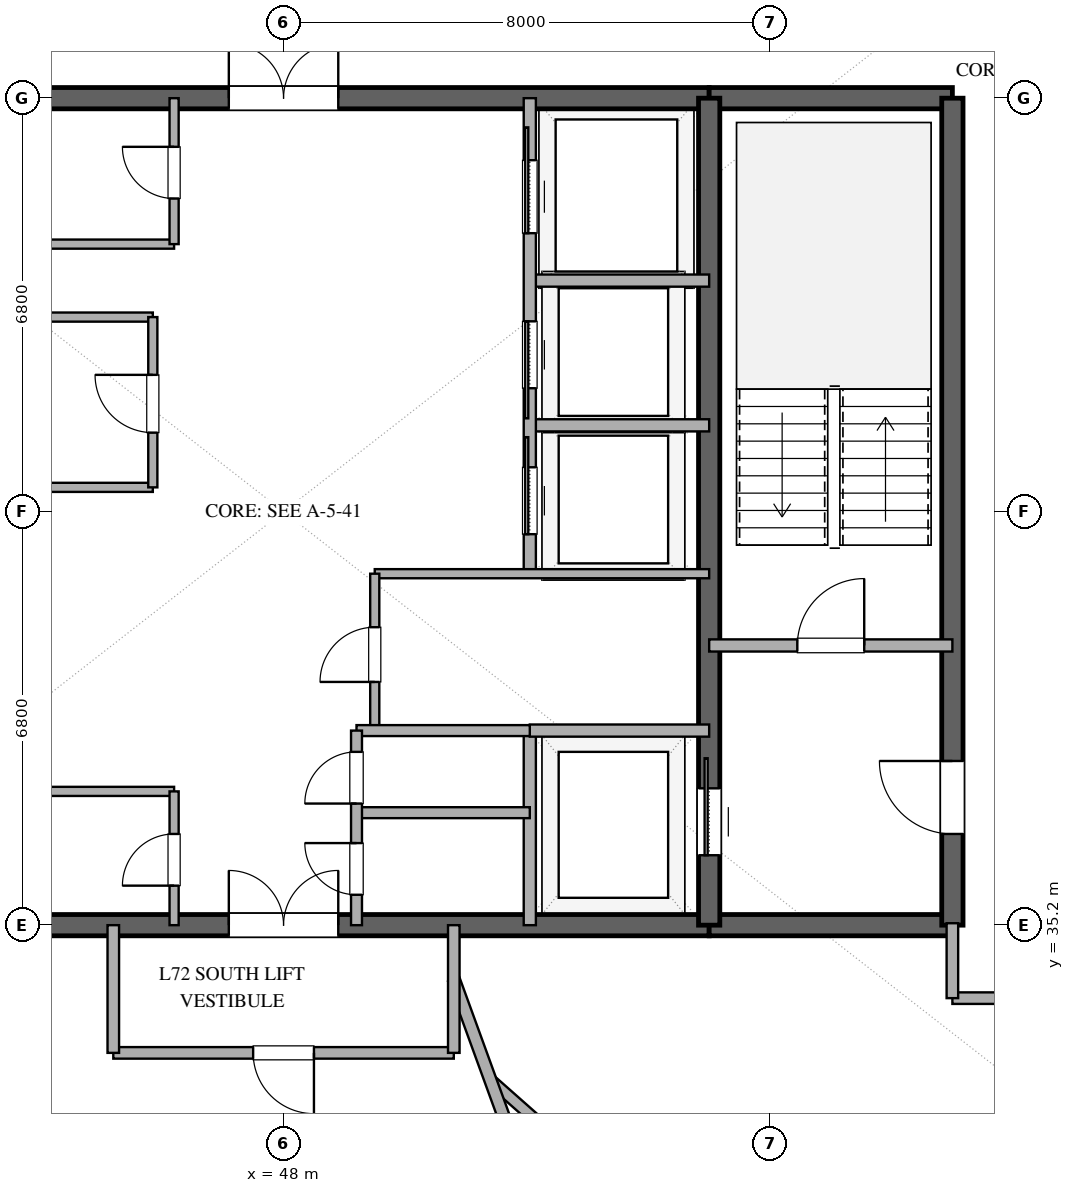
"""IFC4 building model, lengths in metres.
Left out: names, types, materials, properties, quantities, classifications, styles, units other than length and angle.
Written with IfcOpenShell. Run it as: python <this file> out.ifc"""

import sys

from ifc_helpers import new_model, si_unit, direction, frame, frame_2d, origin, place, context, subcontext, project, spatial, rectangle, extrude, element, fill, save


model = new_model("IFC4")
c1 = context("Model", 3, precision=1e-05, world=origin(), true_north=direction((0.0, 1.0)))
c2 = subcontext(c1, "Body", "Model", "MODEL_VIEW")
j1 = project(units=[si_unit("LENGTHUNIT", "METRE"), si_unit("PLANEANGLEUNIT", "RADIAN")], contexts=[c1])
p1 = place(None, origin())
s1 = spatial("IfcSite", under=j1, at=p1, CompositionType="ELEMENT")
p2 = place(p1, origin())
s2 = spatial("IfcBuilding", under=s1, at=p2, CompositionType="ELEMENT")
p3 = place(p2, frame((0.0, 0.0, 280.2)))
s3 = spatial("IfcBuildingStorey", under=s2, at=p3, CompositionType="ELEMENT", Elevation=280.2)
p4 = place(p3, frame((41.0, 35.2, 0.0), z_axis=(0.0, 0.0, 1.0), x_axis=(1.0, 0.0, 0.0)))
e1 = element("IfcWall", 1, at=p4, inside=s3, PredefinedType="SHEAR", context=c2, shape_type="SweptSolid", body=[
    extrude(rectangle(XDim=14.0, YDim=0.35, at=frame_2d((7.0, 0.0))), origin(), (0.0, 0.0, 1.0), 3.37),
])
p5 = place(p4, frame((6.1, 0.0, 0.0)))
e2 = element("IfcOpeningElement", 2, at=p5, cuts=e1, PredefinedType="OPENING", context=c2, shape_type="SweptSolid", body=[
    extrude(rectangle(XDim=1.8, YDim=2.25, at=frame_2d((0.9, 1.125))), frame((0.0, 0.185, 0.0), z_axis=(0.0, -1.0, 0.0), x_axis=(1.0, 0.0, 0.0)), (0.0, 0.0, 1.0), 0.37),
])
p6 = place(p3, frame((55.0, 35.2, 0.0), z_axis=(0.0, 0.0, 1.0), x_axis=(1.0, 0.0, 0.0)))
e3 = element("IfcWall", 3, at=p6, inside=s3, PredefinedType="SHEAR", context=c2, shape_type="SweptSolid", body=[
    extrude(rectangle(XDim=4.0, YDim=0.35, at=frame_2d((2.0, 0.0))), origin(), (0.0, 0.0, 1.0), 3.37),
])
p7 = place(p3, frame((41.0, 48.8, 0.0), z_axis=(0.0, 0.0, 1.0), x_axis=(1.0, 0.0, 0.0)))
e4 = element("IfcWall", 4, at=p7, inside=s3, PredefinedType="SHEAR", context=c2, shape_type="SweptSolid", body=[
    extrude(rectangle(XDim=14.0, YDim=0.35, at=frame_2d((7.0, 0.0))), origin(), (0.0, 0.0, 1.0), 3.37),
])
p8 = place(p7, frame((6.1, 0.0, 0.0)))
e5 = element("IfcOpeningElement", 5, at=p8, cuts=e4, PredefinedType="OPENING", context=c2, shape_type="SweptSolid", body=[
    extrude(rectangle(XDim=1.8, YDim=2.25, at=frame_2d((0.9, 1.125))), frame((0.0, 0.185, 0.0), z_axis=(0.0, -1.0, 0.0), x_axis=(1.0, 0.0, 0.0)), (0.0, 0.0, 1.0), 0.37),
])
p9 = place(p3, frame((55.0, 48.8, 0.0), z_axis=(0.0, 0.0, 1.0), x_axis=(1.0, 0.0, 0.0)))
e6 = element("IfcWall", 6, at=p9, inside=s3, PredefinedType="SHEAR", context=c2, shape_type="SweptSolid", body=[
    extrude(rectangle(XDim=4.0, YDim=0.35, at=frame_2d((2.0, 0.0))), origin(), (0.0, 0.0, 1.0), 3.37),
])
p10 = place(p3, frame((59.0, 35.2, 0.0), z_axis=(0.0, 0.0, 1.0), x_axis=(0.0, 1.0, 0.0)))
e7 = element("IfcWall", 7, at=p10, inside=s3, PredefinedType="SHEAR", context=c2, shape_type="SweptSolid", body=[
    extrude(rectangle(XDim=13.6, YDim=0.35, at=frame_2d((6.8, 0.0))), origin(), (0.0, 0.0, 1.0), 3.37),
])
p11 = place(p10, frame((1.5, 0.0, 0.0)))
e8 = element("IfcOpeningElement", 8, at=p11, cuts=e7, PredefinedType="OPENING", context=c2, shape_type="SweptSolid", body=[
    extrude(rectangle(XDim=1.2, YDim=2.15, at=frame_2d((0.6, 1.075))), frame((0.0, 0.185, 0.0), z_axis=(0.0, -1.0, 0.0), x_axis=(1.0, 0.0, 0.0)), (0.0, 0.0, 1.0), 0.37),
])
p12 = place(p3, frame((55.0, 35.2, 0.0), z_axis=(0.0, 0.0, 1.0), x_axis=(0.0, 1.0, 0.0)))
e9 = element("IfcWall", 9, at=p12, inside=s3, PredefinedType="SHEAR", context=c2, shape_type="SweptSolid", body=[
    extrude(rectangle(XDim=13.6, YDim=0.35, at=frame_2d((6.8, 0.0))), origin(), (0.0, 0.0, 1.0), 3.37),
])
p13 = place(p12, frame((1.15, 0.0, 0.0)))
e10 = element("IfcOpeningElement", 10, at=p13, cuts=e9, PredefinedType="OPENING", context=c2, shape_type="SweptSolid", body=[
    extrude(rectangle(XDim=1.1, YDim=2.2, at=frame_2d((0.55, 1.1))), frame((0.0, 0.185, 0.0), z_axis=(0.0, -1.0, 0.0), x_axis=(1.0, 0.0, 0.0)), (0.0, 0.0, 1.0), 0.37),
])
p14 = place(p3, frame((55.0, 39.8, 0.0), z_axis=(0.0, 0.0, 1.0), x_axis=(1.0, 0.0, 0.0)))
e11 = element("IfcWall", 11, at=p14, inside=s3, PredefinedType="SOLIDWALL", context=c2, shape_type="SweptSolid", body=[
    extrude(rectangle(XDim=4.0, YDim=0.2, at=frame_2d((2.0, 0.0))), origin(), (0.0, 0.0, 1.0), 2.73),
])
p15 = place(p14, frame((1.45, 0.0, 0.0)))
e12 = element("IfcOpeningElement", 12, at=p15, cuts=e11, PredefinedType="OPENING", context=c2, shape_type="SweptSolid", body=[
    extrude(rectangle(XDim=1.1, YDim=2.15, at=frame_2d((0.55, 1.075))), frame((0.0, 0.11, 0.0), z_axis=(0.0, -1.0, 0.0), x_axis=(1.0, 0.0, 0.0)), (0.0, 0.0, 1.0), 0.22),
])
p16 = place(p3, frame((52.05, 35.2, 0.0), z_axis=(0.0, 0.0, 1.0), x_axis=(0.0, 1.0, 0.0)))
e13 = element("IfcWall", 13, at=p16, inside=s3, PredefinedType="SOLIDWALL", context=c2, shape_type="SweptSolid", body=[
    extrude(rectangle(XDim=3.2, YDim=0.2, at=frame_2d((1.6, 0.0))), origin(), (0.0, 0.0, 1.0), 2.73),
])
p17 = place(p3, frame((52.05, 38.4, 0.0), z_axis=(0.0, 0.0, 1.0), x_axis=(1.0, 0.0, 0.0)))
e14 = element("IfcWall", 14, at=p17, inside=s3, PredefinedType="SOLIDWALL", context=c2, shape_type="SweptSolid", body=[
    extrude(rectangle(XDim=2.95, YDim=0.2, at=frame_2d((1.475, 0.0))), origin(), (0.0, 0.0, 1.0), 2.73),
])
for number, where, z_axis, x_axis in (
    (15, (41.0, 42.4, 0.0), (0.0, 0.0, 1.0), (1.0, 0.0, 0.0)),
    (16, (41.0, 45.2, 0.0), (0.0, 0.0, 1.0), (1.0, 0.0, 0.0)),
):
    element("IfcWall", number, at=place(p3, frame(where, z_axis=z_axis, x_axis=x_axis)), inside=s3, PredefinedType="PARTITIONING", context=c2, shape_type="SweptSolid", body=[
        extrude(rectangle(XDim=4.85, YDim=0.15, at=frame_2d((2.425, 0.0))), origin(), (0.0, 0.0, 1.0), 2.73),
    ])
p18 = place(p3, frame((45.85, 42.4, 0.0), z_axis=(0.0, 0.0, 1.0), x_axis=(0.0, 1.0, 0.0)))
e17 = element("IfcWall", 17, at=p18, inside=s3, PredefinedType="PARTITIONING", context=c2, shape_type="SweptSolid", body=[
    extrude(rectangle(XDim=2.8, YDim=0.15, at=frame_2d((1.4, 0.0))), origin(), (0.0, 0.0, 1.0), 2.73),
])
p19 = place(p18, frame((0.9, 0.0, 0.0)))
e18 = element("IfcOpeningElement", 18, at=p19, cuts=e17, PredefinedType="OPENING", context=c2, shape_type="SweptSolid", body=[
    extrude(rectangle(XDim=0.95, YDim=2.15, at=frame_2d((0.475, 1.075))), frame((0.0, 0.085, 0.0), z_axis=(0.0, -1.0, 0.0), x_axis=(1.0, 0.0, 0.0)), (0.0, 0.0, 1.0), 0.17),
])
for number, where, z_axis, x_axis in (
    (19, (52.05, 43.42, 0.0), (0.0, 0.0, 1.0), (1.0, 0.0, 0.0)),
    (20, (52.05, 45.8, 0.0), (0.0, 0.0, 1.0), (1.0, 0.0, 0.0)),
):
    element("IfcWall", number, at=place(p3, frame(where, z_axis=z_axis, x_axis=x_axis)), inside=s3, PredefinedType="SOLIDWALL", context=c2, shape_type="SweptSolid", body=[
        extrude(rectangle(XDim=2.95, YDim=0.2, at=frame_2d((1.475, 0.0))), origin(), (0.0, 0.0, 1.0), 2.73),
    ])
p20 = place(p3, frame((52.05, 40.98, 0.0), z_axis=(0.0, 0.0, 1.0), x_axis=(0.0, 1.0, 0.0)))
e21 = element("IfcWall", 21, at=p20, inside=s3, PredefinedType="SOLIDWALL", context=c2, shape_type="SweptSolid", body=[
    extrude(rectangle(XDim=7.82, YDim=0.2, at=frame_2d((3.91, 0.0))), origin(), (0.0, 0.0, 1.0), 2.73),
])
p21 = place(p20, frame((0.65, 0.0, 0.0)))
e22 = element("IfcOpeningElement", 22, at=p21, cuts=e21, PredefinedType="OPENING", context=c2, shape_type="SweptSolid", body=[
    extrude(rectangle(XDim=1.1, YDim=2.2, at=frame_2d((0.55, 1.1))), frame((0.0, 0.11, 0.0), z_axis=(0.0, -1.0, 0.0), x_axis=(1.0, 0.0, 0.0)), (0.0, 0.0, 1.0), 0.22),
])
p22 = place(p20, frame((3.05, 0.0, 0.0)))
e23 = element("IfcOpeningElement", 23, at=p22, cuts=e21, PredefinedType="OPENING", context=c2, shape_type="SweptSolid", body=[
    extrude(rectangle(XDim=1.1, YDim=2.2, at=frame_2d((0.55, 1.1))), frame((0.0, 0.11, 0.0), z_axis=(0.0, -1.0, 0.0), x_axis=(1.0, 0.0, 0.0)), (0.0, 0.0, 1.0), 0.22),
])
p23 = place(p20, frame((5.6, 0.0, 0.0)))
e24 = element("IfcOpeningElement", 24, at=p23, cuts=e21, PredefinedType="OPENING", context=c2, shape_type="SweptSolid", body=[
    extrude(rectangle(XDim=1.2, YDim=2.2, at=frame_2d((0.6, 1.1))), frame((0.0, 0.11, 0.0), z_axis=(0.0, -1.0, 0.0), x_axis=(1.0, 0.0, 0.0)), (0.0, 0.0, 1.0), 0.22),
])
p24 = place(p3, frame((49.5, 40.98, 0.0), z_axis=(0.0, 0.0, 1.0), x_axis=(1.0, 0.0, 0.0)))
e25 = element("IfcWall", 25, at=p24, inside=s3, PredefinedType="PARTITIONING", context=c2, shape_type="SweptSolid", body=[
    extrude(rectangle(XDim=5.5, YDim=0.15, at=frame_2d((2.75, 0.0))), origin(), (0.0, 0.0, 1.0), 2.73),
])
p25 = place(p3, frame((49.5, 38.4, 0.0), z_axis=(0.0, 0.0, 1.0), x_axis=(0.0, 1.0, 0.0)))
e26 = element("IfcWall", 26, at=p25, inside=s3, PredefinedType="PARTITIONING", context=c2, shape_type="SweptSolid", body=[
    extrude(rectangle(XDim=2.58, YDim=0.15, at=frame_2d((1.29, 0.0))), origin(), (0.0, 0.0, 1.0), 2.73),
])
p26 = place(p25, frame((0.8, 0.0, 0.0)))
e27 = element("IfcOpeningElement", 27, at=p26, cuts=e26, PredefinedType="OPENING", context=c2, shape_type="SweptSolid", body=[
    extrude(rectangle(XDim=0.9, YDim=2.15, at=frame_2d((0.45, 1.075))), frame((0.0, 0.085, 0.0), z_axis=(0.0, -1.0, 0.0), x_axis=(1.0, 0.0, 0.0)), (0.0, 0.0, 1.0), 0.17),
])
p27 = place(p3, frame((43.95, 37.4, 0.0), z_axis=(0.0, 0.0, 1.0), x_axis=(1.0, 0.0, 0.0)))
e28 = element("IfcWall", 28, at=p27, inside=s3, PredefinedType="PARTITIONING", context=c2, shape_type="SweptSolid", body=[
    extrude(rectangle(XDim=2.25, YDim=0.15, at=frame_2d((1.125, 0.0))), origin(), (0.0, 0.0, 1.0), 2.73),
])
p28 = place(p3, frame((46.2, 35.2, 0.0), z_axis=(0.0, 0.0, 1.0), x_axis=(0.0, 1.0, 0.0)))
e29 = element("IfcWall", 29, at=p28, inside=s3, PredefinedType="PARTITIONING", context=c2, shape_type="SweptSolid", body=[
    extrude(rectangle(XDim=2.2, YDim=0.15, at=frame_2d((1.1, 0.0))), origin(), (0.0, 0.0, 1.0), 2.73),
])
p29 = place(p28, frame((0.65, 0.0, 0.0)))
e30 = element("IfcOpeningElement", 30, at=p29, cuts=e29, PredefinedType="OPENING", context=c2, shape_type="SweptSolid", body=[
    extrude(rectangle(XDim=0.85, YDim=2.15, at=frame_2d((0.425, 1.075))), frame((0.0, 0.085, 0.0), z_axis=(0.0, -1.0, 0.0), x_axis=(1.0, 0.0, 0.0)), (0.0, 0.0, 1.0), 0.17),
])
p30 = place(p3, frame((43.95, 46.4, 0.0), z_axis=(0.0, 0.0, 1.0), x_axis=(1.0, 0.0, 0.0)))
e31 = element("IfcWall", 31, at=p30, inside=s3, PredefinedType="PARTITIONING", context=c2, shape_type="SweptSolid", body=[
    extrude(rectangle(XDim=2.25, YDim=0.15, at=frame_2d((1.125, 0.0))), origin(), (0.0, 0.0, 1.0), 2.73),
])
p31 = place(p3, frame((46.2, 46.4, 0.0), z_axis=(0.0, 0.0, 1.0), x_axis=(0.0, 1.0, 0.0)))
e32 = element("IfcWall", 32, at=p31, inside=s3, PredefinedType="PARTITIONING", context=c2, shape_type="SweptSolid", body=[
    extrude(rectangle(XDim=2.4, YDim=0.15, at=frame_2d((1.2, 0.0))), origin(), (0.0, 0.0, 1.0), 2.73),
])
p32 = place(p31, frame((0.75, 0.0, 0.0)))
e33 = element("IfcOpeningElement", 33, at=p32, cuts=e32, PredefinedType="OPENING", context=c2, shape_type="SweptSolid", body=[
    extrude(rectangle(XDim=0.85, YDim=2.15, at=frame_2d((0.425, 1.075))), frame((0.0, 0.085, 0.0), z_axis=(0.0, -1.0, 0.0), x_axis=(1.0, 0.0, 0.0)), (0.0, 0.0, 1.0), 0.17),
])
for number, where, z_axis, x_axis in (
    (34, (49.2, 37.05, 0.0), (0.0, 0.0, 1.0), (1.0, 0.0, 0.0)),
    (35, (49.2, 38.4, 0.0), (0.0, 0.0, 1.0), (1.0, 0.0, 0.0)),
):
    element("IfcWall", number, at=place(p3, frame(where, z_axis=z_axis, x_axis=x_axis)), inside=s3, PredefinedType="PLUMBINGWALL", context=c2, shape_type="SweptSolid", body=[
        extrude(rectangle(XDim=2.85, YDim=0.18, at=frame_2d((1.425, 0.0))), origin(), (0.0, 0.0, 1.0), 2.73),
    ])
p33 = place(p3, frame((49.2, 35.2, 0.0), z_axis=(0.0, 0.0, 1.0), x_axis=(0.0, 1.0, 0.0)))
e36 = element("IfcWall", 36, at=p33, inside=s3, PredefinedType="PLUMBINGWALL", context=c2, shape_type="SweptSolid", body=[
    extrude(rectangle(XDim=3.2, YDim=0.18, at=frame_2d((1.6, 0.0))), origin(), (0.0, 0.0, 1.0), 2.73),
])
p34 = place(p33, frame((0.5, 0.0, 0.0)))
e37 = element("IfcOpeningElement", 37, at=p34, cuts=e36, PredefinedType="OPENING", context=c2, shape_type="SweptSolid", body=[
    extrude(rectangle(XDim=0.85, YDim=2.1, at=frame_2d((0.425, 1.05))), frame((0.0, 0.1, 0.0), z_axis=(0.0, -1.0, 0.0), x_axis=(1.0, 0.0, 0.0)), (0.0, 0.0, 1.0), 0.2),
])
p35 = place(p33, frame((2.0, 0.0, 0.0)))
e38 = element("IfcOpeningElement", 38, at=p35, cuts=e36, PredefinedType="OPENING", context=c2, shape_type="SweptSolid", body=[
    extrude(rectangle(XDim=0.85, YDim=2.15, at=frame_2d((0.425, 1.075))), frame((0.0, 0.1, 0.0), z_axis=(0.0, -1.0, 0.0), x_axis=(1.0, 0.0, 0.0)), (0.0, 0.0, 1.0), 0.2),
])
p36 = place(p3, frame((56.389, 28.246, 0.0), z_axis=(0.0, 0.0, 1.0), x_axis=(-0.749087509224, 0.662471058632, 0.0)))
e39 = element("IfcWall", 39, at=p36, inside=s3, PredefinedType="PLUMBINGWALL", context=c2, shape_type="SweptSolid", body=[
    extrude(rectangle(XDim=6.66, YDim=0.18, at=frame_2d((3.33, 0.0))), origin(), (0.0, 0.0, 1.0), 2.73),
])
p37 = place(p36, frame((2.905, 0.0, 0.0)))
e40 = element("IfcOpeningElement", 40, at=p37, cuts=e39, PredefinedType="OPENING", context=c2, shape_type="SweptSolid", body=[
    extrude(rectangle(XDim=0.85, YDim=2.1, at=frame_2d((0.425, 1.05))), frame((0.0, 0.1, 0.0), z_axis=(0.0, -1.0, 0.0), x_axis=(1.0, 0.0, 0.0)), (0.0, 0.0, 1.0), 0.2),
])
p38 = place(p3, frame((50.8, 33.1, 0.0), z_axis=(0.0, 0.0, 1.0), x_axis=(-1.0, 0.0, 0.0)))
e41 = element("IfcWall", 41, at=p38, inside=s3, PredefinedType="PARTITIONING", context=c2, shape_type="SweptSolid", body=[
    extrude(rectangle(XDim=5.6, YDim=0.19, at=frame_2d((2.8, 0.0))), origin(), (0.0, 0.0, 1.0), 2.73),
])
p39 = place(p38, frame((2.3, 0.0, 0.0)))
e42 = element("IfcOpeningElement", 42, at=p39, cuts=e41, PredefinedType="OPENING", context=c2, shape_type="SweptSolid", body=[
    extrude(rectangle(XDim=1.0, YDim=2.2, at=frame_2d((0.5, 1.1))), frame((0.0, 0.105, 0.0), z_axis=(0.0, -1.0, 0.0), x_axis=(1.0, 0.0, 0.0)), (0.0, 0.0, 1.0), 0.21),
])
p40 = place(p3, frame((50.8, 34.307, 0.0), z_axis=(0.0, 0.0, 1.0), x_axis=(0.342010724278, -0.939696048985, 0.0)))
e43 = element("IfcWall", 43, at=p40, inside=s3, PredefinedType="PARTITIONING", context=c2, shape_type="SweptSolid", body=[
    extrude(rectangle(XDim=8.568, YDim=0.2, at=frame_2d((4.284, 0.0))), origin(), (0.0, 0.0, 1.0), 2.73),
])
p41 = place(p3, frame((61.2, 34.0, 0.0), z_axis=(0.0, 0.0, 1.0), x_axis=(-1.0, 0.0, 0.0)))
e44 = element("IfcWall", 44, at=p41, inside=s3, PredefinedType="PARTITIONING", context=c2, shape_type="SweptSolid", body=[
    extrude(rectangle(XDim=2.2, YDim=0.19, at=frame_2d((1.1, 0.0))), origin(), (0.0, 0.0, 1.0), 2.73),
])
for number, where, z_axis, x_axis in (
    (45, (45.2, 33.1, 0.0), (0.0, 0.0, 1.0), (0.0, 1.0, 0.0)),
    (46, (50.8, 35.2, 0.0), (0.0, 0.0, 1.0), (0.0, -1.0, 0.0)),
):
    element("IfcWall", number, at=place(p3, frame(where, z_axis=z_axis, x_axis=x_axis)), inside=s3, PredefinedType="PARTITIONING", context=c2, shape_type="SweptSolid", body=[
        extrude(rectangle(XDim=2.1, YDim=0.19, at=frame_2d((1.05, 0.0))), origin(), (0.0, 0.0, 1.0), 2.73),
    ])
p42 = place(p3, frame((59.0, 34.0, 0.0), z_axis=(0.0, 0.0, 1.0), x_axis=(0.0, 1.0, 0.0)))
e47 = element("IfcWall", 47, at=p42, inside=s3, PredefinedType="PARTITIONING", context=c2, shape_type="SweptSolid", body=[
    extrude(rectangle(XDim=1.232, YDim=0.19, at=frame_2d((0.616, 0.0))), origin(), (0.0, 0.0, 1.0), 2.73),
])
p43 = place(p13, origin())
e48 = element("IfcDoor", 48, at=p43, inside=s3, OperationType="SLIDING_TO_RIGHT", PredefinedType="DOOR", context=c2, shape_type="SweptSolid", body=[
    extrude(rectangle(XDim=1.1, YDim=2.2, at=frame_2d((0.55, 1.1))), frame((0.0, 0.025, 0.0), z_axis=(0.0, -1.0, 0.0), x_axis=(1.0, 0.0, 0.0)), (0.0, 0.0, 1.0), 0.05),
])
fill(e10, e48)
p44 = place(p11, origin())
e49 = element("IfcDoor", 49, at=p44, inside=s3, OperationType="SINGLE_SWING_RIGHT", PredefinedType="DOOR", context=c2, shape_type="SweptSolid", body=[
    extrude(rectangle(XDim=1.2, YDim=2.15, at=frame_2d((0.6, 1.075))), frame((0.0, 0.025, 0.0), z_axis=(0.0, -1.0, 0.0), x_axis=(1.0, 0.0, 0.0)), (0.0, 0.0, 1.0), 0.05),
])
fill(e8, e49)
p45 = place(p5, origin())
e50 = element("IfcDoor", 50, at=p45, inside=s3, OperationType="DOUBLE_DOOR_SINGLE_SWING", PredefinedType="DOOR", context=c2, shape_type="SweptSolid", body=[
    extrude(rectangle(XDim=1.8, YDim=2.25, at=frame_2d((0.9, 1.125))), frame((0.0, 0.025, 0.0), z_axis=(0.0, -1.0, 0.0), x_axis=(1.0, 0.0, 0.0)), (0.0, 0.0, 1.0), 0.05),
])
fill(e2, e50)
p46 = place(p8, origin())
e51 = element("IfcDoor", 51, at=p46, inside=s3, OperationType="DOUBLE_DOOR_SINGLE_SWING", PredefinedType="DOOR", context=c2, shape_type="SweptSolid", body=[
    extrude(rectangle(XDim=1.8, YDim=2.25, at=frame_2d((0.9, 1.125))), frame((0.0, 0.025, 0.0), z_axis=(0.0, -1.0, 0.0), x_axis=(1.0, 0.0, 0.0)), (0.0, 0.0, 1.0), 0.05),
])
fill(e5, e51)
p47 = place(p15, origin())
e52 = element("IfcDoor", 52, at=p47, inside=s3, OperationType="SINGLE_SWING_RIGHT", PredefinedType="DOOR", context=c2, shape_type="SweptSolid", body=[
    extrude(rectangle(XDim=1.1, YDim=2.15, at=frame_2d((0.55, 1.075))), frame((0.0, 0.025, 0.0), z_axis=(0.0, -1.0, 0.0), x_axis=(1.0, 0.0, 0.0)), (0.0, 0.0, 1.0), 0.05),
])
fill(e12, e52)
p48 = place(p19, origin())
e53 = element("IfcDoor", 53, at=p48, inside=s3, OperationType="SINGLE_SWING_RIGHT", PredefinedType="DOOR", context=c2, shape_type="SweptSolid", body=[
    extrude(rectangle(XDim=0.95, YDim=2.15, at=frame_2d((0.475, 1.075))), frame((0.0, 0.025, 0.0), z_axis=(0.0, -1.0, 0.0), x_axis=(1.0, 0.0, 0.0)), (0.0, 0.0, 1.0), 0.05),
])
fill(e18, e53)
p49 = place(p21, origin())
e54 = element("IfcDoor", 54, at=p49, inside=s3, OperationType="SLIDING_TO_RIGHT", PredefinedType="DOOR", context=c2, shape_type="SweptSolid", body=[
    extrude(rectangle(XDim=1.1, YDim=2.2, at=frame_2d((0.55, 1.1))), frame((0.0, 0.025, 0.0), z_axis=(0.0, -1.0, 0.0), x_axis=(1.0, 0.0, 0.0)), (0.0, 0.0, 1.0), 0.05),
])
fill(e22, e54)
p50 = place(p22, origin())
e55 = element("IfcDoor", 55, at=p50, inside=s3, OperationType="SLIDING_TO_LEFT", PredefinedType="DOOR", context=c2, shape_type="SweptSolid", body=[
    extrude(rectangle(XDim=1.1, YDim=2.2, at=frame_2d((0.55, 1.1))), frame((0.0, 0.025, 0.0), z_axis=(0.0, -1.0, 0.0), x_axis=(1.0, 0.0, 0.0)), (0.0, 0.0, 1.0), 0.05),
])
fill(e23, e55)
p51 = place(p23, origin())
e56 = element("IfcDoor", 56, at=p51, inside=s3, OperationType="SLIDING_TO_RIGHT", PredefinedType="DOOR", context=c2, shape_type="SweptSolid", body=[
    extrude(rectangle(XDim=1.2, YDim=2.2, at=frame_2d((0.6, 1.1))), frame((0.0, 0.025, 0.0), z_axis=(0.0, -1.0, 0.0), x_axis=(1.0, 0.0, 0.0)), (0.0, 0.0, 1.0), 0.05),
])
fill(e24, e56)
p52 = place(p26, origin())
e57 = element("IfcDoor", 57, at=p52, inside=s3, OperationType="SINGLE_SWING_LEFT", PredefinedType="DOOR", context=c2, shape_type="SweptSolid", body=[
    extrude(rectangle(XDim=0.9, YDim=2.15, at=frame_2d((0.45, 1.075))), frame((0.0, 0.025, 0.0), z_axis=(0.0, -1.0, 0.0), x_axis=(1.0, 0.0, 0.0)), (0.0, 0.0, 1.0), 0.05),
])
fill(e27, e57)
p53 = place(p29, origin())
e58 = element("IfcDoor", 58, at=p53, inside=s3, OperationType="SINGLE_SWING_LEFT", PredefinedType="DOOR", context=c2, shape_type="SweptSolid", body=[
    extrude(rectangle(XDim=0.85, YDim=2.15, at=frame_2d((0.425, 1.075))), frame((0.0, 0.025, 0.0), z_axis=(0.0, -1.0, 0.0), x_axis=(1.0, 0.0, 0.0)), (0.0, 0.0, 1.0), 0.05),
])
fill(e30, e58)
p54 = place(p32, origin())
e59 = element("IfcDoor", 59, at=p54, inside=s3, OperationType="SINGLE_SWING_RIGHT", PredefinedType="DOOR", context=c2, shape_type="SweptSolid", body=[
    extrude(rectangle(XDim=0.85, YDim=2.15, at=frame_2d((0.425, 1.075))), frame((0.0, 0.025, 0.0), z_axis=(0.0, -1.0, 0.0), x_axis=(1.0, 0.0, 0.0)), (0.0, 0.0, 1.0), 0.05),
])
fill(e33, e59)
p55 = place(p34, origin())
e60 = element("IfcDoor", 60, at=p55, inside=s3, OperationType="SINGLE_SWING_RIGHT", PredefinedType="DOOR", context=c2, shape_type="SweptSolid", body=[
    extrude(rectangle(XDim=0.85, YDim=2.1, at=frame_2d((0.425, 1.05))), frame((0.0, 0.025, 0.0), z_axis=(0.0, -1.0, 0.0), x_axis=(1.0, 0.0, 0.0)), (0.0, 0.0, 1.0), 0.05),
])
fill(e37, e60)
p56 = place(p35, origin())
e61 = element("IfcDoor", 61, at=p56, inside=s3, OperationType="SINGLE_SWING_LEFT", PredefinedType="DOOR", context=c2, shape_type="SweptSolid", body=[
    extrude(rectangle(XDim=0.85, YDim=2.15, at=frame_2d((0.425, 1.075))), frame((0.0, 0.025, 0.0), z_axis=(0.0, -1.0, 0.0), x_axis=(1.0, 0.0, 0.0)), (0.0, 0.0, 1.0), 0.05),
])
fill(e38, e61)
p57 = place(p39, origin())
e62 = element("IfcDoor", 62, at=p57, inside=s3, OperationType="SINGLE_SWING_LEFT", PredefinedType="DOOR", context=c2, shape_type="SweptSolid", body=[
    extrude(rectangle(XDim=1.0, YDim=2.2, at=frame_2d((0.5, 1.1))), frame((0.0, 0.025, 0.0), z_axis=(0.0, -1.0, 0.0), x_axis=(1.0, 0.0, 0.0)), (0.0, 0.0, 1.0), 0.05),
])
fill(e42, e62)
save(model, sys.argv[1])
